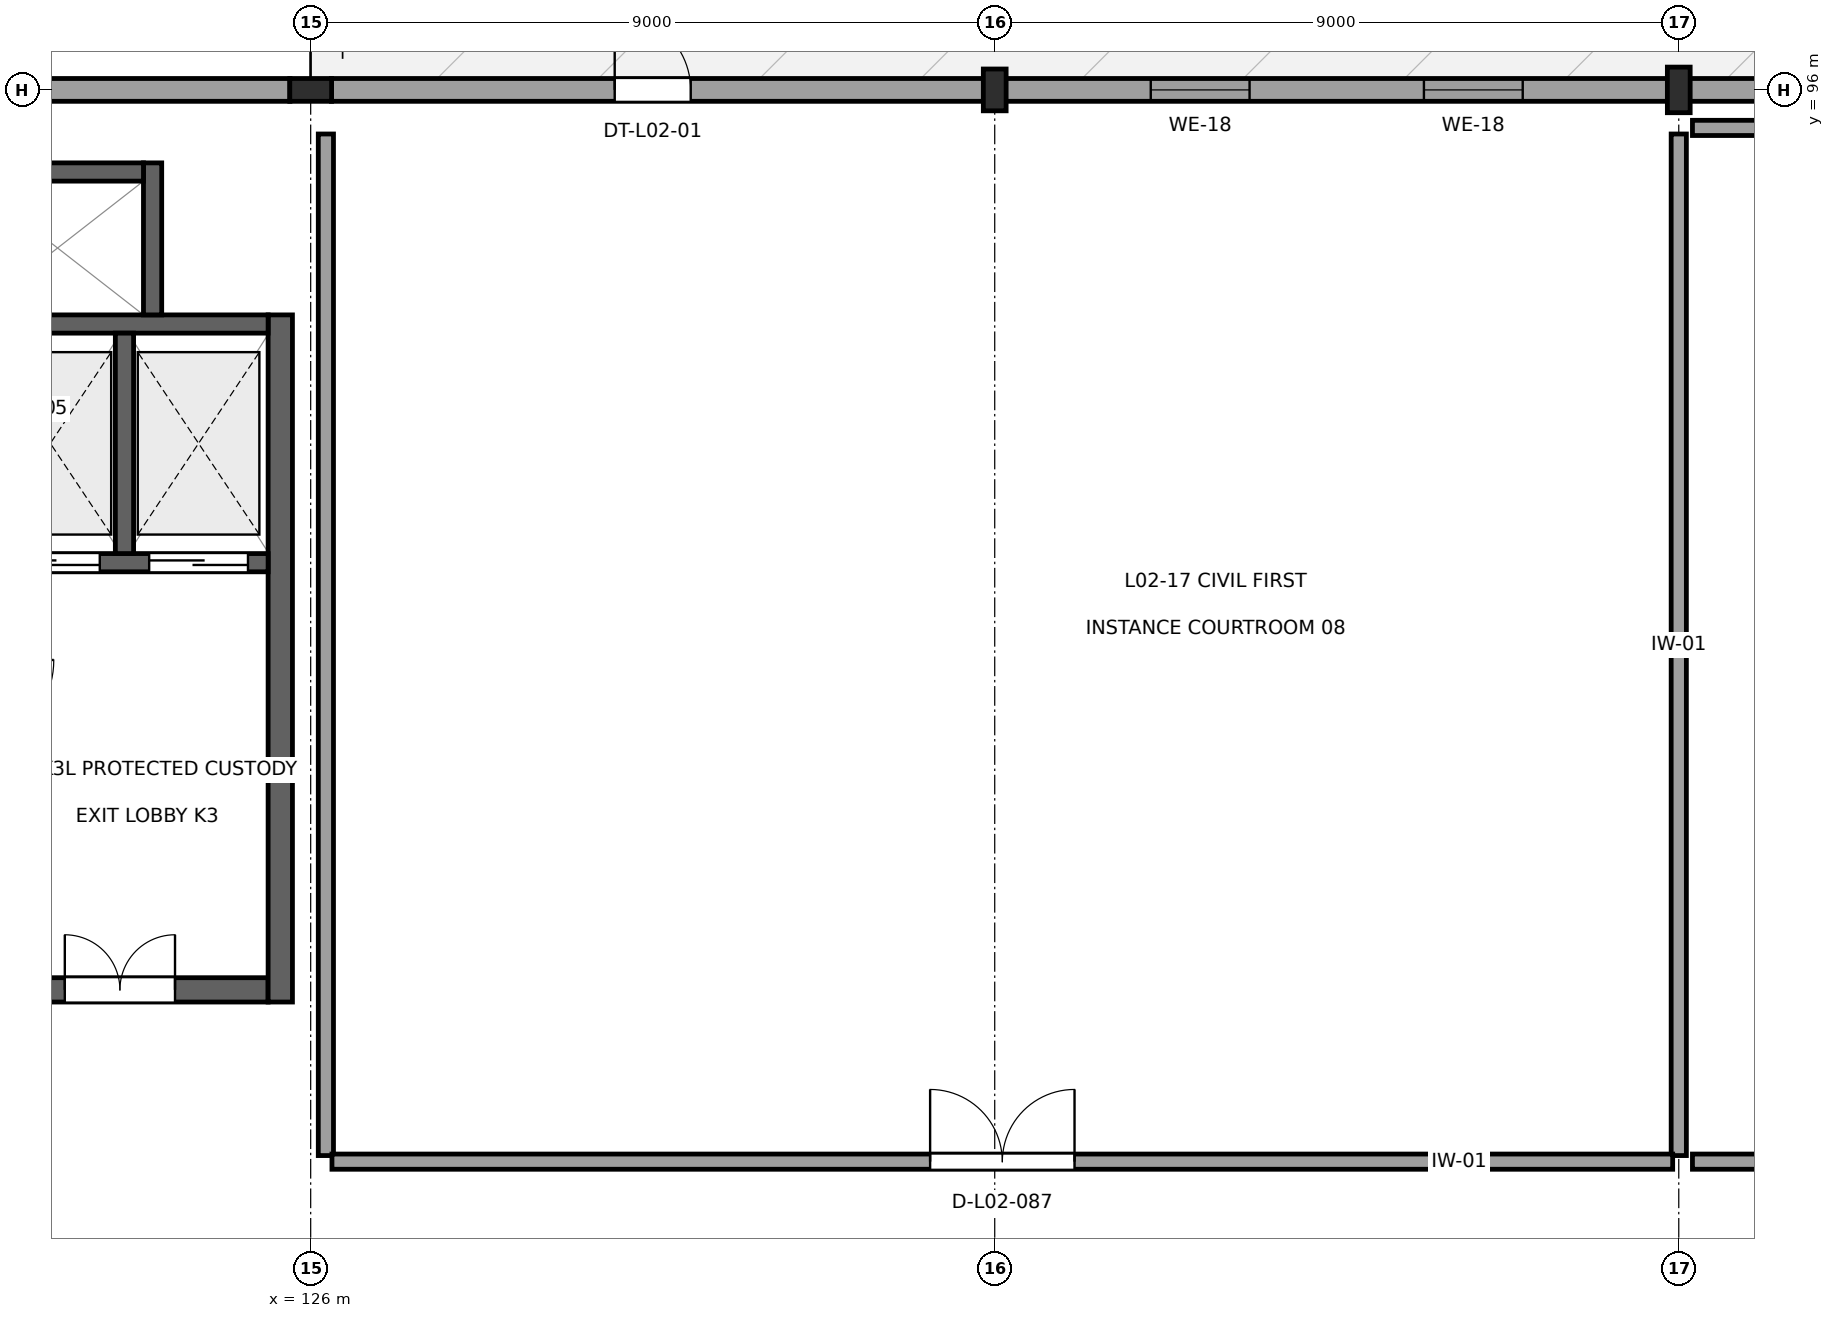
"""IFC4 building model, lengths in metres.
Left out: names, types, materials, properties, quantities, classifications, styles, units other than length and angle.
Written with IfcOpenShell. Run it as: python <this file> out.ifc"""

import sys

from ifc_helpers import new_model, si_unit, direction, frame, frame_2d, origin, origin_2d, place, context, subcontext, project, spatial, rectangle, i_section, extrude, element, fill, save


model = new_model("IFC4")
c1 = context("Model", 3, precision=1e-05, world=origin(), true_north=direction((0.0, 1.0)))
c2 = subcontext(c1, "Body", "Model", "MODEL_VIEW")
j1 = project(units=[si_unit("LENGTHUNIT", "METRE"), si_unit("PLANEANGLEUNIT", "RADIAN")], contexts=[c1])
p1 = place(None, origin())
s1 = spatial("IfcSite", under=j1, at=p1, CompositionType="ELEMENT")
p2 = place(p1, origin())
s2 = spatial("IfcBuilding", under=s1, at=p2, CompositionType="ELEMENT")
p3 = place(p2, frame((0.0, 0.0, 9.9)))
s3 = spatial("IfcBuildingStorey", under=s2, at=p3, CompositionType="ELEMENT", Elevation=9.9)
for number, where, z_axis, x_axis in (
    (1, (126.0, 96.0, 0.0), (0.0, 0.0, 1.0), (0.0, 1.0, 0.0)),
    (2, (135.0, 96.0, 0.0), (0.0, 0.0, 1.0), (1.0, 0.0, 0.0)),
):
    element("IfcColumn", number, at=place(p3, frame(where, z_axis=z_axis, x_axis=x_axis)), inside=s3, PredefinedType="COLUMN", context=c2, shape_type="SweptSolid", body=[
        extrude(i_section(OverallWidth=0.3, OverallDepth=0.55, WebThickness=0.015, FlangeThickness=0.029, at=origin_2d()), origin(), (0.0, 0.0, 1.0), 4.5),
    ])
p4 = place(p3, frame((144.0, 96.0, 0.0), z_axis=(0.0, 0.0, 1.0), x_axis=(1.0, 0.0, 0.0)))
e3 = element("IfcColumn", 3, at=p4, inside=s3, PredefinedType="COLUMN", context=c2, shape_type="SweptSolid", body=[
    extrude(i_section(OverallWidth=0.3, OverallDepth=0.6, WebThickness=0.015, FlangeThickness=0.03, at=origin_2d()), origin(), (0.0, 0.0, 1.0), 4.5),
])
p5 = place(p3, frame((152.992, 96.0, 0.0), z_axis=(0.0, 0.0, 1.0), x_axis=(-1.0, 0.0, 0.0)))
e4 = element("IfcWall", 4, at=p5, inside=s3, PredefinedType="SOLIDWALL", context=c2, shape_type="SweptSolid", body=[
    extrude(rectangle(XDim=8.984, YDim=0.3, at=frame_2d((4.492, 0.0))), origin(), (0.0, 0.0, 1.0), 3.187),
])
p6 = place(p5, frame((2.045, 0.0, 0.9)))
e5 = element("IfcOpeningElement", 5, at=p6, cuts=e4, PredefinedType="OPENING", context=c2, shape_type="SweptSolid", body=[
    extrude(rectangle(XDim=1.3, YDim=1.3, at=frame_2d((0.65, 0.65))), frame((0.0, 0.165, 0.0), z_axis=(0.0, -1.0, 0.0), x_axis=(1.0, 0.0, 0.0)), (0.0, 0.0, 1.0), 0.33),
])
p7 = place(p5, frame((5.639, 0.0, 0.9)))
e6 = element("IfcOpeningElement", 6, at=p7, cuts=e4, PredefinedType="OPENING", context=c2, shape_type="SweptSolid", body=[
    extrude(rectangle(XDim=1.3, YDim=1.3, at=frame_2d((0.65, 0.65))), frame((0.0, 0.165, 0.0), z_axis=(0.0, -1.0, 0.0), x_axis=(1.0, 0.0, 0.0)), (0.0, 0.0, 1.0), 0.33),
])
p8 = place(p3, frame((143.992, 96.0, 0.0), z_axis=(0.0, 0.0, 1.0), x_axis=(-1.0, 0.0, 0.0)))
e7 = element("IfcWall", 7, at=p8, inside=s3, PredefinedType="SOLIDWALL", context=c2, shape_type="SweptSolid", body=[
    extrude(rectangle(XDim=8.984, YDim=0.3, at=frame_2d((4.492, 0.0))), origin(), (0.0, 0.0, 1.0), 3.187),
])
p9 = place(p8, frame((2.045, 0.0, 0.9)))
e8 = element("IfcOpeningElement", 8, at=p9, cuts=e7, PredefinedType="OPENING", context=c2, shape_type="SweptSolid", body=[
    extrude(rectangle(XDim=1.3, YDim=1.3, at=frame_2d((0.65, 0.65))), frame((0.0, 0.165, 0.0), z_axis=(0.0, -1.0, 0.0), x_axis=(1.0, 0.0, 0.0)), (0.0, 0.0, 1.0), 0.33),
])
p10 = place(p8, frame((5.639, 0.0, 0.9)))
e9 = element("IfcOpeningElement", 9, at=p10, cuts=e7, PredefinedType="OPENING", context=c2, shape_type="SweptSolid", body=[
    extrude(rectangle(XDim=1.3, YDim=1.3, at=frame_2d((0.65, 0.65))), frame((0.0, 0.165, 0.0), z_axis=(0.0, -1.0, 0.0), x_axis=(1.0, 0.0, 0.0)), (0.0, 0.0, 1.0), 0.33),
])
p11 = place(p3, frame((134.992, 96.0, 0.0), z_axis=(0.0, 0.0, 1.0), x_axis=(-1.0, 0.0, 0.0)))
e10 = element("IfcWall", 10, at=p11, inside=s3, PredefinedType="SOLIDWALL", context=c2, shape_type="SweptSolid", body=[
    extrude(rectangle(XDim=8.719, YDim=0.3, at=frame_2d((4.359, 0.0))), origin(), (0.0, 0.0, 1.0), 3.605),
])
p12 = place(p11, frame((3.992, 0.0, 0.0)))
e11 = element("IfcOpeningElement", 11, at=p12, cuts=e10, PredefinedType="OPENING", context=c2, shape_type="SweptSolid", body=[
    extrude(rectangle(XDim=1.0, YDim=2.2, at=frame_2d((0.5, 1.1))), frame((0.0, 0.165, 0.0), z_axis=(0.0, -1.0, 0.0), x_axis=(1.0, 0.0, 0.0)), (0.0, 0.0, 1.0), 0.33),
])
p13 = place(p3, frame((125.727, 96.0, 0.0), z_axis=(0.0, 0.0, 1.0), x_axis=(-1.0, 0.0, 0.0)))
e12 = element("IfcWall", 12, at=p13, inside=s3, PredefinedType="SOLIDWALL", context=c2, shape_type="SweptSolid", body=[
    extrude(rectangle(XDim=8.719, YDim=0.3, at=frame_2d((4.359, 0.0))), origin(), (0.0, 0.0, 1.0), 3.605),
])
p14 = place(p3, frame((121.54, 84.16, 0.0), z_axis=(0.0, 0.0, 1.0), x_axis=(1.0, 0.0, 0.0)))
e13 = element("IfcWall", 13, at=p14, inside=s3, PredefinedType="SHEAR", context=c2, shape_type="SweptSolid", body=[
    extrude(rectangle(XDim=3.9, YDim=0.32, at=frame_2d((1.95, 0.0))), origin(), (0.0, 0.0, 1.0), 4.16),
])
p15 = place(p14, frame((1.225, 0.0, 0.0)))
e14 = element("IfcOpeningElement", 14, at=p15, cuts=e13, PredefinedType="OPENING", context=c2, shape_type="SweptSolid", body=[
    extrude(rectangle(XDim=1.45, YDim=2.2, at=frame_2d((0.725, 1.1))), frame((0.0, 0.175, 0.0), z_axis=(0.0, -1.0, 0.0), x_axis=(1.0, 0.0, 0.0)), (0.0, 0.0, 1.0), 0.35),
])
p16 = place(p3, frame((125.6, 84.0, 0.0), z_axis=(0.0, 0.0, 1.0), x_axis=(0.0, 1.0, 0.0)))
e15 = element("IfcWall", 15, at=p16, inside=s3, PredefinedType="SHEAR", context=c2, shape_type="SweptSolid", body=[
    extrude(rectangle(XDim=9.04, YDim=0.32, at=frame_2d((4.52, 0.0))), origin(), (0.0, 0.0, 1.0), 4.16),
])
p17 = place(p3, frame((121.54, 89.78, 0.0), z_axis=(0.0, 0.0, 1.0), x_axis=(1.0, 0.0, 0.0)))
e16 = element("IfcWall", 16, at=p17, inside=s3, PredefinedType="SHEAR", context=c2, shape_type="SweptSolid", body=[
    extrude(rectangle(XDim=3.9, YDim=0.24, at=frame_2d((1.95, 0.0))), origin(), (0.0, 0.0, 1.0), 4.31),
])
p18 = place(p17, frame((0.385, 0.0, 0.0)))
e17 = element("IfcOpeningElement", 17, at=p18, cuts=e16, PredefinedType="OPENING", context=c2, shape_type="SweptSolid", body=[
    extrude(rectangle(XDim=1.3, YDim=2.2, at=frame_2d((0.65, 1.1))), frame((0.0, 0.135, 0.0), z_axis=(0.0, -1.0, 0.0), x_axis=(1.0, 0.0, 0.0)), (0.0, 0.0, 1.0), 0.27),
])
p19 = place(p17, frame((2.335, 0.0, 0.0)))
e18 = element("IfcOpeningElement", 18, at=p19, cuts=e16, PredefinedType="OPENING", context=c2, shape_type="SweptSolid", body=[
    extrude(rectangle(XDim=1.3, YDim=2.2, at=frame_2d((0.65, 1.1))), frame((0.0, 0.135, 0.0), z_axis=(0.0, -1.0, 0.0), x_axis=(1.0, 0.0, 0.0)), (0.0, 0.0, 1.0), 0.27),
])
p20 = place(p3, frame((121.54, 92.92, 0.0), z_axis=(0.0, 0.0, 1.0), x_axis=(1.0, 0.0, 0.0)))
e19 = element("IfcWall", 19, at=p20, inside=s3, PredefinedType="SHEAR", context=c2, shape_type="SweptSolid", body=[
    extrude(rectangle(XDim=3.9, YDim=0.24, at=frame_2d((1.95, 0.0))), origin(), (0.0, 0.0, 1.0), 4.31),
])
p21 = place(p3, frame((123.55, 89.9, 0.0), z_axis=(0.0, 0.0, 1.0), x_axis=(0.0, 1.0, 0.0)))
e20 = element("IfcWall", 20, at=p21, inside=s3, PredefinedType="SHEAR", context=c2, shape_type="SweptSolid", body=[
    extrude(rectangle(XDim=2.9, YDim=0.24, at=frame_2d((1.45, 0.0))), origin(), (0.0, 0.0, 1.0), 4.31),
])
p22 = place(p3, frame((123.92, 93.04, 0.0), z_axis=(0.0, 0.0, 1.0), x_axis=(0.0, 1.0, 0.0)))
e21 = element("IfcWall", 21, at=p22, inside=s3, PredefinedType="SHEAR", context=c2, shape_type="SweptSolid", body=[
    extrude(rectangle(XDim=2.0, YDim=0.24, at=frame_2d((1.0, 0.0))), origin(), (0.0, 0.0, 1.0), 4.31),
])
p23 = place(p3, frame((121.54, 94.92, 0.0), z_axis=(0.0, 0.0, 1.0), x_axis=(1.0, 0.0, 0.0)))
e22 = element("IfcWall", 22, at=p23, inside=s3, PredefinedType="SHEAR", context=c2, shape_type="SweptSolid", body=[
    extrude(rectangle(XDim=2.26, YDim=0.24, at=frame_2d((1.13, 0.0))), origin(), (0.0, 0.0, 1.0), 4.31),
])
p24 = place(p3, frame((126.2, 81.98, 0.0), z_axis=(0.0, 0.0, 1.0), x_axis=(0.0, 1.0, 0.0)))
e23 = element("IfcWall", 23, at=p24, inside=s3, PredefinedType="PARTITIONING", context=c2, shape_type="SweptSolid", body=[
    extrude(rectangle(XDim=13.44, YDim=0.2, at=frame_2d((6.72, 0.0))), origin(), (0.0, 0.0, 1.0), 3.505),
])
p25 = place(p3, frame((144.0, 95.42, 0.0), z_axis=(0.0, 0.0, 1.0), x_axis=(0.0, -1.0, 0.0)))
e24 = element("IfcWall", 24, at=p25, inside=s3, PredefinedType="PARTITIONING", context=c2, shape_type="SweptSolid", body=[
    extrude(rectangle(XDim=13.44, YDim=0.2, at=frame_2d((6.72, 0.0))), origin(), (0.0, 0.0, 1.0), 3.395),
])
p26 = place(p3, frame((143.92, 81.9, 0.0), z_axis=(0.0, 0.0, 1.0), x_axis=(-1.0, 0.0, 0.0)))
e25 = element("IfcWall", 25, at=p26, inside=s3, PredefinedType="PARTITIONING", context=c2, shape_type="SweptSolid", body=[
    extrude(rectangle(XDim=17.64, YDim=0.2, at=frame_2d((8.82, 0.0))), origin(), (0.0, 0.0, 1.0), 4.14),
])
p27 = place(p26, frame((7.87, 0.0, 0.0)))
e26 = element("IfcOpeningElement", 26, at=p27, cuts=e25, PredefinedType="OPENING", context=c2, shape_type="SweptSolid", body=[
    extrude(rectangle(XDim=1.9, YDim=2.5, at=frame_2d((0.95, 1.25))), frame((0.0, 0.115, 0.0), z_axis=(0.0, -1.0, 0.0), x_axis=(1.0, 0.0, 0.0)), (0.0, 0.0, 1.0), 0.23),
])
p28 = place(p3, frame((153.365, 81.9, 0.0), z_axis=(0.0, 0.0, 1.0), x_axis=(-1.0, 0.0, 0.0)))
e27 = element("IfcWall", 27, at=p28, inside=s3, PredefinedType="PARTITIONING", context=c2, shape_type="SweptSolid", body=[
    extrude(rectangle(XDim=9.185, YDim=0.2, at=frame_2d((4.593, 0.0))), origin(), (0.0, 0.0, 1.0), 4.14),
])
p29 = place(p28, frame((3.693, 0.0, 0.0)))
e28 = element("IfcOpeningElement", 28, at=p29, cuts=e27, PredefinedType="OPENING", context=c2, shape_type="SweptSolid", body=[
    extrude(rectangle(XDim=1.8, YDim=2.45, at=frame_2d((0.9, 1.225))), frame((0.0, 0.115, 0.0), z_axis=(0.0, -1.0, 0.0), x_axis=(1.0, 0.0, 0.0)), (0.0, 0.0, 1.0), 0.23),
])
p30 = place(p3, frame((144.18, 95.5, 0.0), z_axis=(0.0, 0.0, 1.0), x_axis=(1.0, 0.0, 0.0)))
e29 = element("IfcWall", 29, at=p30, inside=s3, PredefinedType="PARTITIONING", context=c2, shape_type="SweptSolid", body=[
    extrude(rectangle(XDim=8.94, YDim=0.2, at=frame_2d((4.47, 0.0))), origin(), (0.0, 0.0, 1.0), 4.14),
])
p31 = place(p12, frame((1.0, 0.0, 0.0), z_axis=(0.0, 0.0, 1.0), x_axis=(-1.0, 0.0, 0.0)))
e30 = element("IfcDoor", 30, at=p31, inside=s3, OperationType="SINGLE_SWING_RIGHT", PredefinedType="DOOR", context=c2, shape_type="SweptSolid", body=[
    extrude(rectangle(XDim=1.0, YDim=2.2, at=frame_2d((0.5, 1.1))), frame((0.0, 0.025, 0.0), z_axis=(0.0, -1.0, 0.0), x_axis=(1.0, 0.0, 0.0)), (0.0, 0.0, 1.0), 0.05),
])
fill(e11, e30)
p32 = place(p9, origin())
e31 = element("IfcWindow", 31, at=p32, inside=s3, PartitioningType="SINGLE_PANEL", PredefinedType="WINDOW", context=c2, shape_type="SweptSolid", body=[
    extrude(rectangle(XDim=1.3, YDim=1.3, at=frame_2d((0.65, 0.65))), frame((0.0, 0.03, 0.0), z_axis=(0.0, -1.0, 0.0), x_axis=(1.0, 0.0, 0.0)), (0.0, 0.0, 1.0), 0.06),
])
fill(e8, e31)
p33 = place(p10, origin())
e32 = element("IfcWindow", 32, at=p33, inside=s3, PartitioningType="SINGLE_PANEL", PredefinedType="WINDOW", context=c2, shape_type="SweptSolid", body=[
    extrude(rectangle(XDim=1.3, YDim=1.3, at=frame_2d((0.65, 0.65))), frame((0.0, 0.03, 0.0), z_axis=(0.0, -1.0, 0.0), x_axis=(1.0, 0.0, 0.0)), (0.0, 0.0, 1.0), 0.06),
])
fill(e9, e32)
p34 = place(p15, origin())
e33 = element("IfcDoor", 33, at=p34, inside=s3, OperationType="DOUBLE_DOOR_SINGLE_SWING", PredefinedType="DOOR", context=c2, shape_type="SweptSolid", body=[
    extrude(rectangle(XDim=1.45, YDim=2.2, at=frame_2d((0.725, 1.1))), frame((0.0, 0.025, 0.0), z_axis=(0.0, -1.0, 0.0), x_axis=(1.0, 0.0, 0.0)), (0.0, 0.0, 1.0), 0.05),
])
fill(e14, e33)
p35 = place(p18, origin())
e34 = element("IfcDoor", 34, at=p35, inside=s3, OperationType="DOUBLE_DOOR_SLIDING", PredefinedType="DOOR", context=c2, shape_type="SweptSolid", body=[
    extrude(rectangle(XDim=1.3, YDim=2.2, at=frame_2d((0.65, 1.1))), frame((0.0, 0.025, 0.0), z_axis=(0.0, -1.0, 0.0), x_axis=(1.0, 0.0, 0.0)), (0.0, 0.0, 1.0), 0.05),
])
fill(e17, e34)
p36 = place(p19, origin())
e35 = element("IfcDoor", 35, at=p36, inside=s3, OperationType="DOUBLE_DOOR_SLIDING", PredefinedType="DOOR", context=c2, shape_type="SweptSolid", body=[
    extrude(rectangle(XDim=1.3, YDim=2.2, at=frame_2d((0.65, 1.1))), frame((0.0, 0.025, 0.0), z_axis=(0.0, -1.0, 0.0), x_axis=(1.0, 0.0, 0.0)), (0.0, 0.0, 1.0), 0.05),
])
fill(e18, e35)
p37 = place(p27, frame((1.9, 0.0, 0.0), z_axis=(0.0, 0.0, 1.0), x_axis=(-1.0, 0.0, 0.0)))
e36 = element("IfcDoor", 36, at=p37, inside=s3, OperationType="DOUBLE_DOOR_SINGLE_SWING", PredefinedType="DOOR", context=c2, shape_type="SweptSolid", body=[
    extrude(rectangle(XDim=1.9, YDim=2.5, at=frame_2d((0.95, 1.25))), frame((0.0, 0.025, 0.0), z_axis=(0.0, -1.0, 0.0), x_axis=(1.0, 0.0, 0.0)), (0.0, 0.0, 1.0), 0.05),
])
fill(e26, e36)
save(model, sys.argv[1])
